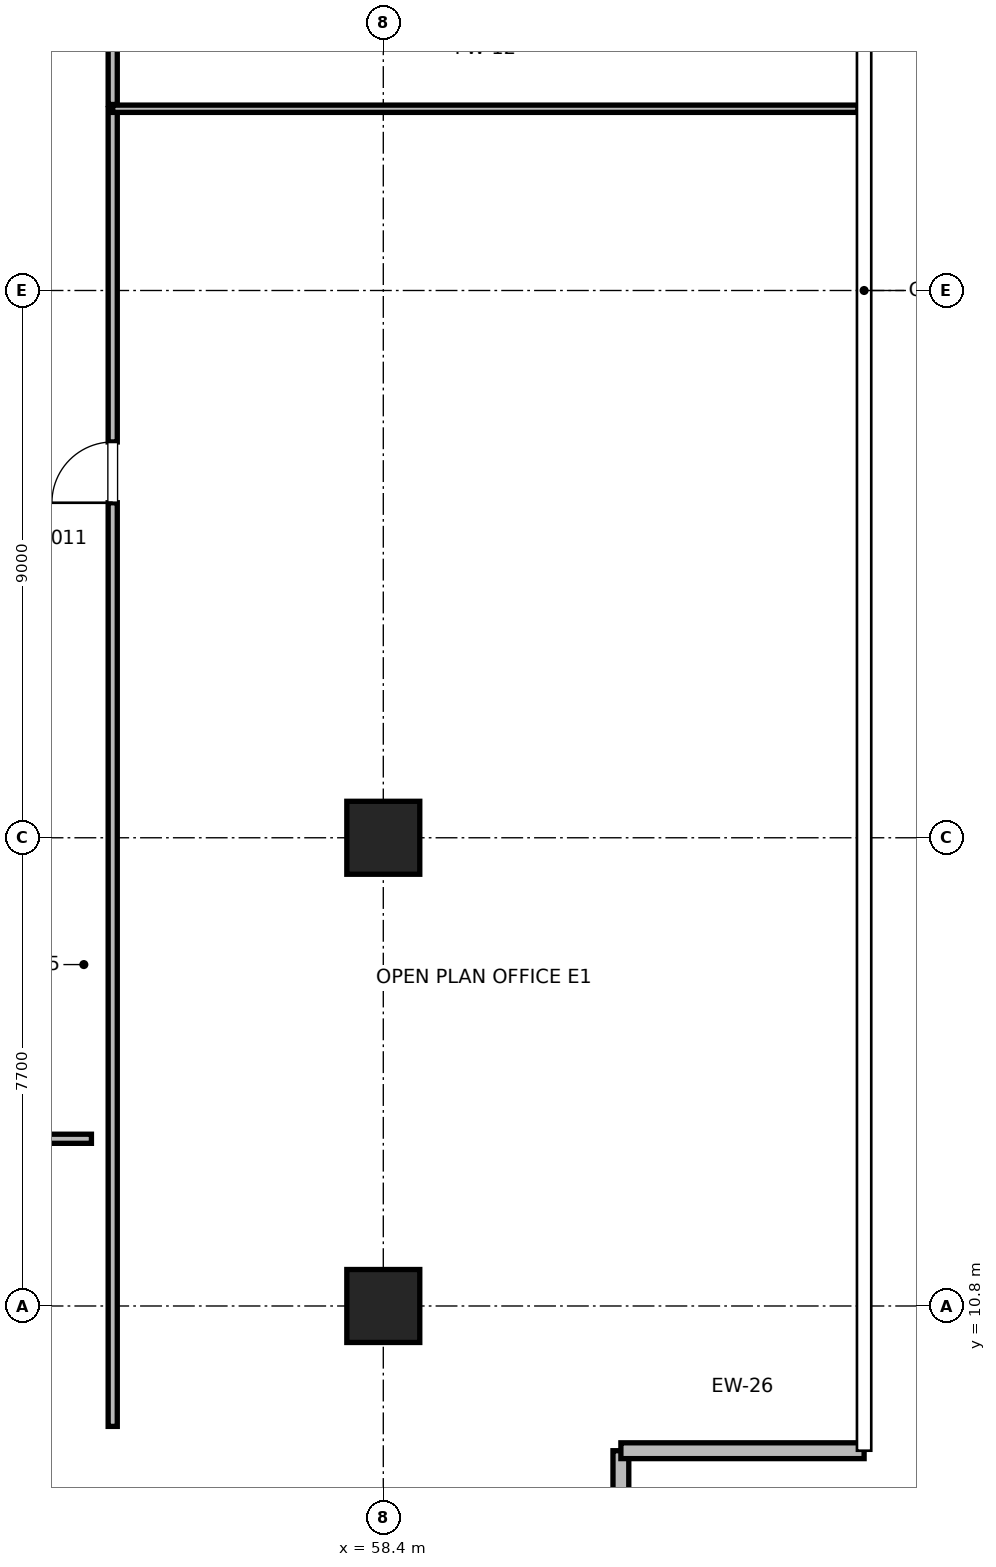
"""IFC4 building model, lengths in metres.
Left out: names, types, materials, properties, quantities, classifications, styles, units other than length and angle.
Written with IfcOpenShell. Run it as: python <this file> out.ifc"""

import sys

from ifc_helpers import new_model, si_unit, direction, frame, frame_2d, origin, origin_2d, place, context, subcontext, project, spatial, rectangle, extrude, element, fill, save


model = new_model("IFC4")
c1 = context("Model", 3, precision=1e-05, world=origin(), true_north=direction((0.0, 1.0)))
c2 = subcontext(c1, "Body", "Model", "MODEL_VIEW")
j1 = project(units=[si_unit("LENGTHUNIT", "METRE"), si_unit("PLANEANGLEUNIT", "RADIAN")], contexts=[c1])
p1 = place(None, origin())
s1 = spatial("IfcSite", under=j1, at=p1, CompositionType="ELEMENT")
p2 = place(p1, origin())
s2 = spatial("IfcBuilding", under=s1, at=p2, CompositionType="ELEMENT")
p3 = place(p2, frame((0.0, 0.0, 243.2)))
s3 = spatial("IfcBuildingStorey", under=s2, at=p3, CompositionType="ELEMENT", Elevation=243.2)
for number, where, z_axis, x_axis in (
    (1, (58.4, 18.5, 0.0), (0.0, 0.0, 1.0), (1.0, 0.0, 0.0)),
    (2, (58.4, 10.8, 0.0), (0.0, 0.0, 1.0), (1.0, 0.0, 0.0)),
):
    element("IfcColumn", number, at=place(p3, frame(where, z_axis=z_axis, x_axis=x_axis)), inside=s3, PredefinedType="COLUMN", context=c2, shape_type="SweptSolid", body=[
        extrude(rectangle(XDim=1.2, YDim=1.2, at=origin_2d()), origin(), (0.0, 0.0, 1.0), 4.0),
    ])
p4 = place(p3, frame((62.308, 4.92, 0.0), z_axis=(0.0, 0.0, 1.0), x_axis=(0.0, 1.0, 0.0)))
e3 = element("IfcWall", 3, at=p4, inside=s3, PredefinedType="PARAPET", context=c2, shape_type="SweptSolid", body=[
    extrude(rectangle(XDim=3.5, YDim=0.26, at=frame_2d((1.75, 0.0))), origin(), (0.0, 0.0, 1.0), 3.785),
])
p5 = place(p4, frame((0.85, 0.0, 0.85)))
e4 = element("IfcOpeningElement", 4, at=p5, cuts=e3, PredefinedType="OPENING", context=c2, shape_type="SweptSolid", body=[
    extrude(rectangle(XDim=1.8, YDim=2.2, at=frame_2d((0.9, 1.1))), frame((0.0, 0.13, 0.0), z_axis=(0.0, -1.0, 0.0), x_axis=(1.0, 0.0, 0.0)), (0.0, 0.0, 1.0), 0.26),
])
p6 = place(p3, frame((62.308, 8.42, 0.0), z_axis=(0.0, 0.0, 1.0), x_axis=(1.0, 0.0, 0.0)))
e5 = element("IfcWall", 5, at=p6, inside=s3, PredefinedType="PARAPET", context=c2, shape_type="SweptSolid", body=[
    extrude(rectangle(XDim=4.0, YDim=0.26, at=frame_2d((2.0, 0.0))), origin(), (0.0, 0.0, 1.0), 3.785),
])
p7 = place(p3, frame((26.4, 13.55, 0.0), z_axis=(0.0, 0.0, 1.0), x_axis=(1.0, 0.0, 0.0)))
e6 = element("IfcWall", 6, at=p7, inside=s3, PredefinedType="PARTITIONING", context=c2, shape_type="SweptSolid", body=[
    extrude(rectangle(XDim=27.2, YDim=0.15, at=frame_2d((13.6, 0.0))), origin(), (0.0, 0.0, 1.0), 2.85),
])
p8 = place(p7, frame((13.1, 0.0, 0.0)))
e7 = element("IfcOpeningElement", 7, at=p8, cuts=e6, PredefinedType="OPENING", context=c2, shape_type="SweptSolid", body=[
    extrude(rectangle(XDim=1.0, YDim=2.15, at=frame_2d((0.5, 1.075))), frame((0.0, 0.075, 0.0), z_axis=(0.0, -1.0, 0.0), x_axis=(1.0, 0.0, 0.0)), (0.0, 0.0, 1.0), 0.15),
])
p9 = place(p3, frame((53.95, 8.82, 0.0), z_axis=(0.0, 0.0, 1.0), x_axis=(0.0, 1.0, 0.0)))
e8 = element("IfcWall", 8, at=p9, inside=s3, PredefinedType="PARTITIONING", context=c2, shape_type="SweptSolid", body=[
    extrude(rectangle(XDim=21.669, YDim=0.15, at=frame_2d((10.834, 0.0))), origin(), (0.0, 0.0, 1.0), 2.85),
])
p10 = place(p9, frame((15.189, 0.0, 0.0)))
e9 = element("IfcOpeningElement", 9, at=p10, cuts=e8, PredefinedType="OPENING", context=c2, shape_type="SweptSolid", body=[
    extrude(rectangle(XDim=1.0, YDim=2.15, at=frame_2d((0.5, 1.075))), frame((0.0, 0.075, 0.0), z_axis=(0.0, -1.0, 0.0), x_axis=(1.0, 0.0, 0.0)), (0.0, 0.0, 1.0), 0.15),
])
p11 = place(p3, frame((53.95, 30.489, 0.0), z_axis=(0.0, 0.0, 1.0), x_axis=(1.0, 0.0, 0.0)))
e10 = element("IfcWall", 10, at=p11, inside=s3, PredefinedType="PARTITIONING", context=c2, shape_type="SweptSolid", body=[
    extrude(rectangle(XDim=12.258, YDim=0.12, at=frame_2d((6.129, 0.0))), origin(), (0.0, 0.0, 1.0), 2.85),
])
p12 = place(p3, frame((53.95, 30.559, 0.0), z_axis=(0.0, 0.0, 1.0), x_axis=(0.0, 1.0, 0.0)))
e11 = element("IfcWall", 11, at=p12, inside=s3, PredefinedType="PARTITIONING", context=c2, shape_type="SweptSolid", body=[
    extrude(rectangle(XDim=15.621, YDim=0.15, at=frame_2d((7.811, 0.0))), origin(), (0.0, 0.0, 1.0), 2.85),
])
p13 = place(p12, frame((2.396, 0.0, 0.0)))
e12 = element("IfcOpeningElement", 12, at=p13, cuts=e11, PredefinedType="OPENING", context=c2, shape_type="SweptSolid", body=[
    extrude(rectangle(XDim=1.05, YDim=2.2, at=frame_2d((0.525, 1.1))), frame((0.0, 0.075, 0.0), z_axis=(0.0, -1.0, 0.0), x_axis=(1.0, 0.0, 0.0)), (0.0, 0.0, 1.0), 0.15),
])
p14 = place(p10, origin())
e13 = element("IfcDoor", 13, at=p14, inside=s3, OperationType="SINGLE_SWING_LEFT", PredefinedType="DOOR", context=c2, shape_type="SweptSolid", body=[
    extrude(rectangle(XDim=1.0, YDim=2.15, at=frame_2d((0.5, 1.075))), frame((0.0, 0.025, 0.0), z_axis=(0.0, -1.0, 0.0), x_axis=(1.0, 0.0, 0.0)), (0.0, 0.0, 1.0), 0.05),
])
fill(e9, e13)
save(model, sys.argv[1])
